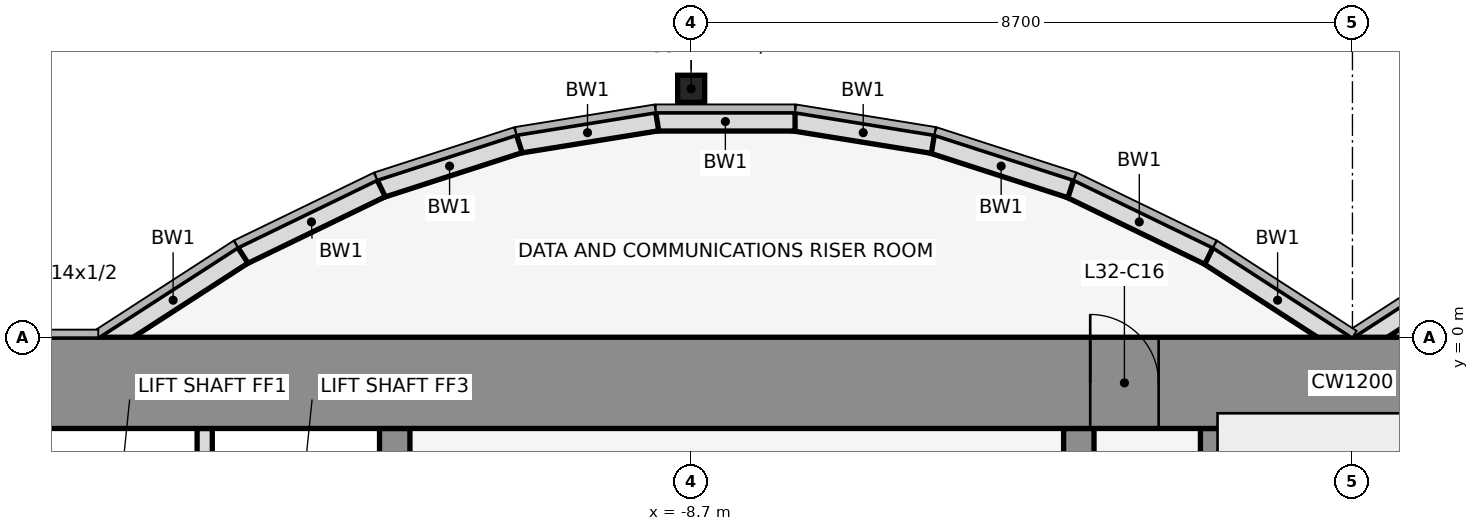
"""IFC4 building model, lengths in metres.
Left out: names, types, materials, properties, quantities, classifications, styles, units other than length and angle.
Written with IfcOpenShell. Run it as: python <this file> out.ifc"""

import sys

from ifc_helpers import new_model, si_unit, direction, frame, frame_2d, origin, origin_2d, place, context, subcontext, project, spatial, rectangle, hollow_rectangle, extrude, element, fill, save


model = new_model("IFC4")
c1 = context("Model", 3, precision=1e-05, world=origin(), true_north=direction((0.0, 1.0)))
c2 = subcontext(c1, "Body", "Model", "MODEL_VIEW")
j1 = project(units=[si_unit("LENGTHUNIT", "METRE"), si_unit("PLANEANGLEUNIT", "RADIAN")], contexts=[c1])
p1 = place(None, origin())
s1 = spatial("IfcSite", under=j1, at=p1, CompositionType="ELEMENT")
p2 = place(p1, origin())
s2 = spatial("IfcBuilding", under=s1, at=p2, CompositionType="ELEMENT")
p3 = place(p2, frame((0.0, 0.0, 148.6)))
s3 = spatial("IfcBuildingStorey", under=s2, at=p3, CompositionType="ELEMENT", Elevation=148.6)
p4 = place(p3, frame((-8.7, 3.269, 0.0), z_axis=(0.0, 0.0, 1.0), x_axis=(1.0, 0.0, 0.0)))
e1 = element("IfcColumn", 1, at=p4, inside=s3, PredefinedType="COLUMN", context=c2, shape_type="SweptSolid", body=[
    extrude(hollow_rectangle(XDim=0.356, YDim=0.356, WallThickness=0.012, at=origin_2d()), origin(), (0.0, 0.0, 1.0), 4.1),
])
for number, where, z_axis, x_axis in (
    (2, (1.901, 1.08, 0.0), (0.0, 0.0, 1.0), (-0.84, -0.543, 0.0)),
    (3, (-0.068, -0.105, 0.0), (0.0, 0.0, 1.0), (-0.84, 0.543, 0.0)),
):
    element("IfcWall", number, at=place(p3, frame(where, z_axis=z_axis, x_axis=x_axis)), inside=s3, PredefinedType="STANDARD", context=c2, shape_type="SweptSolid", body=[
        extrude(rectangle(XDim=2.183, YDim=0.25, at=frame_2d((1.091, 0.0))), origin(), (0.0, 0.0, 1.0), 3.95),
    ])
p5 = place(p3, frame((-1.888, 1.073, 0.0), z_axis=(0.0, 0.0, 1.0), x_axis=(-0.89982408427, 0.436252928206, 0.0)))
e4 = element("IfcWall", 4, at=p5, inside=s3, PredefinedType="STANDARD", context=c2, shape_type="SweptSolid", body=[
    extrude(rectangle(XDim=2.038, YDim=0.25, at=frame_2d((1.019, 0.0))), origin(), (0.0, 0.0, 1.0), 3.95),
])
p6 = place(p3, frame((-3.705, 1.955, 0.0), z_axis=(0.0, 0.0, 1.0), x_axis=(-0.951495806175, 0.307661714928, 0.0)))
e5 = element("IfcWall", 5, at=p6, inside=s3, PredefinedType="STANDARD", context=c2, shape_type="SweptSolid", body=[
    extrude(rectangle(XDim=1.927, YDim=0.25, at=frame_2d((0.963, 0.0))), origin(), (0.0, 0.0, 1.0), 3.95),
])
p7 = place(p3, frame((-5.52, 2.543, 0.0), z_axis=(0.0, 0.0, 1.0), x_axis=(-0.987181718931, 0.159600293885, 0.0)))
e6 = element("IfcWall", 6, at=p7, inside=s3, PredefinedType="STANDARD", context=c2, shape_type="SweptSolid", body=[
    extrude(rectangle(XDim=1.857, YDim=0.25, at=frame_2d((0.929, 0.0))), origin(), (0.0, 0.0, 1.0), 3.95),
])
p8 = place(p3, frame((-7.333, 2.838, 0.0), z_axis=(0.0, 0.0, 1.0), x_axis=(-1.0, 0.0, 0.0)))
e7 = element("IfcWall", 7, at=p8, inside=s3, PredefinedType="STANDARD", context=c2, shape_type="SweptSolid", body=[
    extrude(rectangle(XDim=1.833, YDim=0.25, at=frame_2d((0.917, 0.0))), origin(), (0.0, 0.0, 1.0), 3.95),
])
p9 = place(p3, frame((-9.147, 2.84, 0.0), z_axis=(0.0, 0.0, 1.0), x_axis=(-0.987181718931, -0.159600293885, 0.0)))
e8 = element("IfcWall", 8, at=p9, inside=s3, PredefinedType="STANDARD", context=c2, shape_type="SweptSolid", body=[
    extrude(rectangle(XDim=1.857, YDim=0.25, at=frame_2d((0.929, 0.0))), origin(), (0.0, 0.0, 1.0), 3.95),
])
p10 = place(p3, frame((-10.962, 2.548, 0.0), z_axis=(0.0, 0.0, 1.0), x_axis=(-0.951495806175, -0.307661714928, 0.0)))
e9 = element("IfcWall", 9, at=p10, inside=s3, PredefinedType="STANDARD", context=c2, shape_type="SweptSolid", body=[
    extrude(rectangle(XDim=1.927, YDim=0.25, at=frame_2d((0.963, 0.0))), origin(), (0.0, 0.0, 1.0), 3.95),
])
p11 = place(p3, frame((-12.779, 1.962, 0.0), z_axis=(0.0, 0.0, 1.0), x_axis=(-0.89982408427, -0.436252928206, 0.0)))
e10 = element("IfcWall", 10, at=p11, inside=s3, PredefinedType="STANDARD", context=c2, shape_type="SweptSolid", body=[
    extrude(rectangle(XDim=2.038, YDim=0.25, at=frame_2d((1.019, 0.0))), origin(), (0.0, 0.0, 1.0), 3.95),
])
p12 = place(p3, frame((-14.599, 1.08, 0.0), z_axis=(0.0, 0.0, 1.0), x_axis=(-0.83981312244, -0.542875602121, 0.0)))
e11 = element("IfcWall", 11, at=p12, inside=s3, PredefinedType="STANDARD", context=c2, shape_type="SweptSolid", body=[
    extrude(rectangle(XDim=2.183, YDim=0.25, at=frame_2d((1.091, 0.0))), origin(), (0.0, 0.0, 1.0), 3.95),
])
p13 = place(p3, frame((-15.1, -4.6, 0.0), z_axis=(0.0, 0.0, 1.0), x_axis=(0.0, 1.0, 0.0)))
e12 = element("IfcWall", 12, at=p13, inside=s3, PredefinedType="PARTITIONING", context=c2, shape_type="SweptSolid", body=[
    extrude(rectangle(XDim=3.4, YDim=0.2, at=frame_2d((1.7, 0.0))), origin(), (0.0, 0.0, 1.0), 2.84),
])
p14 = place(p3, frame((-12.6, -11.8, 0.0), z_axis=(0.0, 0.0, 1.0), x_axis=(0.0, 1.0, 0.0)))
e13 = element("IfcWall", 13, at=p14, inside=s3, PredefinedType="SHEAR", context=c2, shape_type="SweptSolid", body=[
    extrude(rectangle(XDim=10.6, YDim=0.4, at=frame_2d((5.3, 0.0))), origin(), (0.0, 0.0, 1.0), 4.1),
])
p15 = place(p14, frame((4.75, 0.0, 0.0)))
e14 = element("IfcOpeningElement", 14, at=p15, cuts=e13, PredefinedType="OPENING", context=c2, shape_type="SweptSolid", body=[
    extrude(rectangle(XDim=1.1, YDim=2.1, at=frame_2d((0.55, 1.05))), frame((0.0, 0.212, 0.0), z_axis=(0.0, -1.0, 0.0), x_axis=(1.0, 0.0, 0.0)), (0.0, 0.0, 1.0), 0.424),
])
p16 = place(p3, frame((-3.6, -11.8, 0.0), z_axis=(0.0, 0.0, 1.0), x_axis=(0.0, 1.0, 0.0)))
e15 = element("IfcWall", 15, at=p16, inside=s3, PredefinedType="SHEAR", context=c2, shape_type="SweptSolid", body=[
    extrude(rectangle(XDim=10.6, YDim=0.4, at=frame_2d((5.3, 0.0))), origin(), (0.0, 0.0, 1.0), 4.1),
])
p17 = place(p16, frame((4.85, 0.0, 0.0)))
e16 = element("IfcOpeningElement", 16, at=p17, cuts=e15, PredefinedType="OPENING", context=c2, shape_type="SweptSolid", body=[
    extrude(rectangle(XDim=0.9, YDim=2.1, at=frame_2d((0.45, 1.05))), frame((0.0, 0.212, 0.0), z_axis=(0.0, -1.0, 0.0), x_axis=(1.0, 0.0, 0.0)), (0.0, 0.0, 1.0), 0.424),
])
p18 = place(p3, frame((-1.8, -11.8, 0.0), z_axis=(0.0, 0.0, 1.0), x_axis=(0.0, 1.0, 0.0)))
e17 = element("IfcWall", 17, at=p18, inside=s3, PredefinedType="SHEAR", context=c2, shape_type="SweptSolid", body=[
    extrude(rectangle(XDim=10.6, YDim=0.4, at=frame_2d((5.3, 0.0))), origin(), (0.0, 0.0, 1.0), 4.1),
])
p19 = place(p3, frame((-22.0, -0.6, 0.0), z_axis=(0.0, 0.0, 1.0), x_axis=(1.0, 0.0, 0.0)))
e18 = element("IfcWall", 18, at=p19, inside=s3, PredefinedType="SHEAR", context=c2, shape_type="SweptSolid", body=[
    extrude(rectangle(XDim=44.0, YDim=1.2, at=frame_2d((22.0, 0.0))), origin(), (0.0, 0.0, 1.0), 4.1),
])
p20 = place(p19, frame((18.55, 0.0, 0.0)))
e19 = element("IfcOpeningElement", 19, at=p20, cuts=e18, PredefinedType="OPENING", context=c2, shape_type="SweptSolid", body=[
    extrude(rectangle(XDim=0.9, YDim=2.1, at=frame_2d((0.45, 1.05))), frame((0.0, 0.612, 0.0), z_axis=(0.0, -1.0, 0.0), x_axis=(1.0, 0.0, 0.0)), (0.0, 0.0, 1.0), 1.224),
])
p21 = place(p19, frame((24.55, 0.0, 0.0)))
e20 = element("IfcOpeningElement", 20, at=p21, cuts=e18, PredefinedType="OPENING", context=c2, shape_type="SweptSolid", body=[
    extrude(rectangle(XDim=0.9, YDim=2.1, at=frame_2d((0.45, 1.05))), frame((0.0, 0.612, 0.0), z_axis=(0.0, -1.0, 0.0), x_axis=(1.0, 0.0, 0.0)), (0.0, 0.0, 1.0), 1.224),
])
p22 = place(p20, origin())
e21 = element("IfcDoor", 21, at=p22, inside=s3, OperationType="SINGLE_SWING_LEFT", PredefinedType="DOOR", context=c2, shape_type="SweptSolid", body=[
    extrude(rectangle(XDim=0.9, YDim=2.1, at=frame_2d((0.45, 1.05))), frame((0.0, 0.025, 0.0), z_axis=(0.0, -1.0, 0.0), x_axis=(1.0, 0.0, 0.0)), (0.0, 0.0, 1.0), 0.05),
])
fill(e19, e21)
save(model, sys.argv[1])
